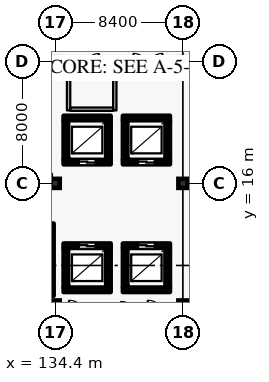
"""IFC4 building model, lengths in metres.
Left out: names, types, materials, properties, quantities, classifications, styles, units other than length and angle.
Written with IfcOpenShell. Run it as: python <this file> out.ifc"""

import sys

from ifc_helpers import new_model, si_unit, direction, frame, frame_2d, origin, origin_2d, place, context, subcontext, project, spatial, rectangle, extrude, element, fill, save


model = new_model("IFC4")
c1 = context("Model", 3, precision=1e-05, world=origin(), true_north=direction((0.0, 1.0)))
c2 = subcontext(c1, "Body", "Model", "MODEL_VIEW")
j1 = project(units=[si_unit("LENGTHUNIT", "METRE"), si_unit("PLANEANGLEUNIT", "RADIAN")], contexts=[c1])
p1 = place(None, origin())
s1 = spatial("IfcSite", under=j1, at=p1, CompositionType="ELEMENT")
p2 = place(p1, origin())
s2 = spatial("IfcBuilding", under=s1, at=p2, CompositionType="ELEMENT")
p3 = place(p2, frame((0.0, 0.0, 43.2)))
s3 = spatial("IfcBuildingStorey", under=s2, at=p3, CompositionType="ELEMENT", Elevation=43.2)
for number, where, z_axis, x_axis in (
    (1, (134.4, 16.0, 0.0), (0.0, 0.0, 1.0), (1.0, 0.0, 0.0)),
    (2, (142.8, 16.0, 0.0), (0.0, 0.0, 1.0), (1.0, 0.0, 0.0)),
    (3, (134.4, 8.0, 0.0), (0.0, 0.0, 1.0), (1.0, 0.0, 0.0)),
    (4, (134.4, 24.0, 0.0), (0.0, 0.0, 1.0), (1.0, 0.0, 0.0)),
    (5, (142.8, 8.0, 0.0), (0.0, 0.0, 1.0), (1.0, 0.0, 0.0)),
    (6, (142.8, 24.0, 0.0), (0.0, 0.0, 1.0), (1.0, 0.0, 0.0)),
):
    element("IfcColumn", number, at=place(p3, frame(where, z_axis=z_axis, x_axis=x_axis)), inside=s3, PredefinedType="COLUMN", context=c2, shape_type="SweptSolid", body=[
        extrude(rectangle(XDim=0.6, YDim=0.6, at=origin_2d()), origin(), (0.0, 0.0, 1.0), 4.2),
    ])
p4 = place(p3, frame((134.95, 17.4, 0.0), z_axis=(0.0, 0.0, 1.0), x_axis=(1.0, 0.0, 0.0)))
e7 = element("IfcWall", 7, at=p4, inside=s3, PredefinedType="SHEAR", context=c2, shape_type="SweptSolid", body=[
    extrude(rectangle(XDim=3.1, YDim=0.3, at=frame_2d((1.55, 0.0))), origin(), (0.0, 0.0, 1.0), 3.935),
])
p5 = place(p4, frame((1.0, 0.0, 0.0)))
e8 = element("IfcOpeningElement", 8, at=p5, cuts=e7, PredefinedType="OPENING", context=c2, shape_type="SweptSolid", body=[
    extrude(rectangle(XDim=1.1, YDim=2.2, at=frame_2d((0.55, 1.1))), frame((0.0, 0.16, 0.0), z_axis=(0.0, -1.0, 0.0), x_axis=(1.0, 0.0, 0.0)), (0.0, 0.0, 1.0), 0.32),
])
p6 = place(p3, frame((137.9, 17.555, 0.0), z_axis=(0.0, 0.0, 1.0), x_axis=(0.0, 1.0, 0.0)))
e9 = element("IfcWall", 9, at=p6, inside=s3, PredefinedType="SHEAR", context=c2, shape_type="SweptSolid", body=[
    extrude(rectangle(XDim=2.59, YDim=0.3, at=frame_2d((1.295, 0.0))), origin(), (0.0, 0.0, 1.0), 3.935),
])
p7 = place(p3, frame((138.05, 20.3, 0.0), z_axis=(0.0, 0.0, 1.0), x_axis=(-1.0, 0.0, 0.0)))
e10 = element("IfcWall", 10, at=p7, inside=s3, PredefinedType="SHEAR", context=c2, shape_type="SweptSolid", body=[
    extrude(rectangle(XDim=3.1, YDim=0.3, at=frame_2d((1.55, 0.0))), origin(), (0.0, 0.0, 1.0), 3.935),
])
p8 = place(p3, frame((135.1, 20.145, 0.0), z_axis=(0.0, 0.0, 1.0), x_axis=(0.0, -1.0, 0.0)))
e11 = element("IfcWall", 11, at=p8, inside=s3, PredefinedType="SHEAR", context=c2, shape_type="SweptSolid", body=[
    extrude(rectangle(XDim=2.59, YDim=0.3, at=frame_2d((1.295, 0.0))), origin(), (0.0, 0.0, 1.0), 3.935),
])
p9 = place(p3, frame((138.85, 17.4, 0.0), z_axis=(0.0, 0.0, 1.0), x_axis=(1.0, 0.0, 0.0)))
e12 = element("IfcWall", 12, at=p9, inside=s3, PredefinedType="SHEAR", context=c2, shape_type="SweptSolid", body=[
    extrude(rectangle(XDim=3.1, YDim=0.3, at=frame_2d((1.55, 0.0))), origin(), (0.0, 0.0, 1.0), 3.935),
])
p10 = place(p9, frame((1.0, 0.0, 0.0)))
e13 = element("IfcOpeningElement", 13, at=p10, cuts=e12, PredefinedType="OPENING", context=c2, shape_type="SweptSolid", body=[
    extrude(rectangle(XDim=1.1, YDim=2.2, at=frame_2d((0.55, 1.1))), frame((0.0, 0.16, 0.0), z_axis=(0.0, -1.0, 0.0), x_axis=(1.0, 0.0, 0.0)), (0.0, 0.0, 1.0), 0.32),
])
p11 = place(p3, frame((141.8, 17.555, 0.0), z_axis=(0.0, 0.0, 1.0), x_axis=(0.0, 1.0, 0.0)))
e14 = element("IfcWall", 14, at=p11, inside=s3, PredefinedType="SHEAR", context=c2, shape_type="SweptSolid", body=[
    extrude(rectangle(XDim=2.59, YDim=0.3, at=frame_2d((1.295, 0.0))), origin(), (0.0, 0.0, 1.0), 3.935),
])
p12 = place(p3, frame((141.95, 20.3, 0.0), z_axis=(0.0, 0.0, 1.0), x_axis=(-1.0, 0.0, 0.0)))
e15 = element("IfcWall", 15, at=p12, inside=s3, PredefinedType="SHEAR", context=c2, shape_type="SweptSolid", body=[
    extrude(rectangle(XDim=3.1, YDim=0.3, at=frame_2d((1.55, 0.0))), origin(), (0.0, 0.0, 1.0), 3.935),
])
p13 = place(p3, frame((139.0, 20.145, 0.0), z_axis=(0.0, 0.0, 1.0), x_axis=(0.0, -1.0, 0.0)))
e16 = element("IfcWall", 16, at=p13, inside=s3, PredefinedType="SHEAR", context=c2, shape_type="SweptSolid", body=[
    extrude(rectangle(XDim=2.59, YDim=0.3, at=frame_2d((1.295, 0.0))), origin(), (0.0, 0.0, 1.0), 3.935),
])
p14 = place(p3, frame((134.95, 9.0, 0.0), z_axis=(0.0, 0.0, 1.0), x_axis=(1.0, 0.0, 0.0)))
e17 = element("IfcWall", 17, at=p14, inside=s3, PredefinedType="SHEAR", context=c2, shape_type="SweptSolid", body=[
    extrude(rectangle(XDim=3.1, YDim=0.3, at=frame_2d((1.55, 0.0))), origin(), (0.0, 0.0, 1.0), 3.935),
])
p15 = place(p3, frame((137.9, 9.155, 0.0), z_axis=(0.0, 0.0, 1.0), x_axis=(0.0, 1.0, 0.0)))
e18 = element("IfcWall", 18, at=p15, inside=s3, PredefinedType="SHEAR", context=c2, shape_type="SweptSolid", body=[
    extrude(rectangle(XDim=2.59, YDim=0.3, at=frame_2d((1.295, 0.0))), origin(), (0.0, 0.0, 1.0), 3.935),
])
p16 = place(p3, frame((138.05, 11.9, 0.0), z_axis=(0.0, 0.0, 1.0), x_axis=(-1.0, 0.0, 0.0)))
e19 = element("IfcWall", 19, at=p16, inside=s3, PredefinedType="SHEAR", context=c2, shape_type="SweptSolid", body=[
    extrude(rectangle(XDim=3.1, YDim=0.3, at=frame_2d((1.55, 0.0))), origin(), (0.0, 0.0, 1.0), 3.935),
])
p17 = place(p16, frame((1.0, 0.0, 0.0)))
e20 = element("IfcOpeningElement", 20, at=p17, cuts=e19, PredefinedType="OPENING", context=c2, shape_type="SweptSolid", body=[
    extrude(rectangle(XDim=1.1, YDim=2.2, at=frame_2d((0.55, 1.1))), frame((0.0, 0.16, 0.0), z_axis=(0.0, -1.0, 0.0), x_axis=(1.0, 0.0, 0.0)), (0.0, 0.0, 1.0), 0.32),
])
p18 = place(p3, frame((135.1, 11.745, 0.0), z_axis=(0.0, 0.0, 1.0), x_axis=(0.0, -1.0, 0.0)))
e21 = element("IfcWall", 21, at=p18, inside=s3, PredefinedType="SHEAR", context=c2, shape_type="SweptSolid", body=[
    extrude(rectangle(XDim=2.59, YDim=0.3, at=frame_2d((1.295, 0.0))), origin(), (0.0, 0.0, 1.0), 3.935),
])
p19 = place(p3, frame((138.85, 9.0, 0.0), z_axis=(0.0, 0.0, 1.0), x_axis=(1.0, 0.0, 0.0)))
e22 = element("IfcWall", 22, at=p19, inside=s3, PredefinedType="SHEAR", context=c2, shape_type="SweptSolid", body=[
    extrude(rectangle(XDim=3.1, YDim=0.3, at=frame_2d((1.55, 0.0))), origin(), (0.0, 0.0, 1.0), 3.935),
])
p20 = place(p3, frame((141.8, 9.155, 0.0), z_axis=(0.0, 0.0, 1.0), x_axis=(0.0, 1.0, 0.0)))
e23 = element("IfcWall", 23, at=p20, inside=s3, PredefinedType="SHEAR", context=c2, shape_type="SweptSolid", body=[
    extrude(rectangle(XDim=2.59, YDim=0.3, at=frame_2d((1.295, 0.0))), origin(), (0.0, 0.0, 1.0), 3.935),
])
p21 = place(p3, frame((141.95, 11.9, 0.0), z_axis=(0.0, 0.0, 1.0), x_axis=(-1.0, 0.0, 0.0)))
e24 = element("IfcWall", 24, at=p21, inside=s3, PredefinedType="SHEAR", context=c2, shape_type="SweptSolid", body=[
    extrude(rectangle(XDim=3.1, YDim=0.3, at=frame_2d((1.55, 0.0))), origin(), (0.0, 0.0, 1.0), 3.935),
])
p22 = place(p21, frame((1.0, 0.0, 0.0)))
e25 = element("IfcOpeningElement", 25, at=p22, cuts=e24, PredefinedType="OPENING", context=c2, shape_type="SweptSolid", body=[
    extrude(rectangle(XDim=1.1, YDim=2.2, at=frame_2d((0.55, 1.1))), frame((0.0, 0.16, 0.0), z_axis=(0.0, -1.0, 0.0), x_axis=(1.0, 0.0, 0.0)), (0.0, 0.0, 1.0), 0.32),
])
p23 = place(p3, frame((139.0, 11.745, 0.0), z_axis=(0.0, 0.0, 1.0), x_axis=(0.0, -1.0, 0.0)))
e26 = element("IfcWall", 26, at=p23, inside=s3, PredefinedType="SHEAR", context=c2, shape_type="SweptSolid", body=[
    extrude(rectangle(XDim=2.59, YDim=0.3, at=frame_2d((1.295, 0.0))), origin(), (0.0, 0.0, 1.0), 3.935),
])
p24 = place(p3, frame((126.15, 8.8, 0.0), z_axis=(0.0, 0.0, 1.0), x_axis=(1.0, 0.0, 0.0)))
e27 = element("IfcWall", 27, at=p24, inside=s3, PredefinedType="SHEAR", context=c2, shape_type="SweptSolid", body=[
    extrude(rectangle(XDim=8.15, YDim=0.4, at=frame_2d((4.075, 0.0))), origin(), (0.0, 0.0, 1.0), 3.935),
])
p25 = place(p3, frame((134.1, 9.005, 0.0), z_axis=(0.0, 0.0, 1.0), x_axis=(0.0, 1.0, 0.0)))
e28 = element("IfcWall", 28, at=p25, inside=s3, PredefinedType="SHEAR", context=c2, shape_type="SweptSolid", body=[
    extrude(rectangle(XDim=3.95, YDim=0.4, at=frame_2d((1.975, 0.0))), origin(), (0.0, 0.0, 1.0), 3.935),
])
p26 = place(p3, frame((126.15, 13.16, 0.0), z_axis=(0.0, 0.0, 1.0), x_axis=(1.0, 0.0, 0.0)))
e29 = element("IfcWall", 29, at=p26, inside=s3, PredefinedType="SHEAR", context=c2, shape_type="SweptSolid", body=[
    extrude(rectangle(XDim=8.15, YDim=0.4, at=frame_2d((4.075, 0.0))), origin(), (0.0, 0.0, 1.0), 3.935),
])
p27 = place(p26, frame((0.38, 0.0, 0.0)))
e30 = element("IfcOpeningElement", 30, at=p27, cuts=e29, PredefinedType="OPENING", context=c2, shape_type="SweptSolid", body=[
    extrude(rectangle(XDim=1.16, YDim=2.2, at=frame_2d((0.58, 1.1))), frame((0.0, 0.21, 0.0), z_axis=(0.0, -1.0, 0.0), x_axis=(1.0, 0.0, 0.0)), (0.0, 0.0, 1.0), 0.42),
])
p28 = place(p3, frame((138.96, 23.6, 0.0), z_axis=(0.0, 0.0, 1.0), x_axis=(1.0, 0.0, 0.0)))
e31 = element("IfcWall", 31, at=p28, inside=s3, PredefinedType="PARTITIONING", context=c2, shape_type="SweptSolid", body=[
    extrude(rectangle(XDim=3.08, YDim=0.14, at=frame_2d((1.54, 0.0))), origin(), (0.0, 0.0, 1.0), 3.935),
])
p29 = place(p28, frame((0.59, 0.0, 0.0)))
e32 = element("IfcOpeningElement", 32, at=p29, cuts=e31, PredefinedType="OPENING", context=c2, shape_type="SweptSolid", body=[
    extrude(rectangle(XDim=1.9, YDim=2.4, at=frame_2d((0.95, 1.2))), frame((0.0, 0.08, 0.0), z_axis=(0.0, -1.0, 0.0), x_axis=(1.0, 0.0, 0.0)), (0.0, 0.0, 1.0), 0.16),
])
p30 = place(p3, frame((135.36, 23.6, 0.0), z_axis=(0.0, 0.0, 1.0), x_axis=(1.0, 0.0, 0.0)))
e33 = element("IfcWall", 33, at=p30, inside=s3, PredefinedType="PARTITIONING", context=c2, shape_type="SweptSolid", body=[
    extrude(rectangle(XDim=2.88, YDim=0.22, at=frame_2d((1.44, 0.0))), origin(), (0.0, 0.0, 1.0), 3.935),
])
p31 = place(p30, frame((0.97, 0.0, 0.0)))
e34 = element("IfcOpeningElement", 34, at=p31, cuts=e33, PredefinedType="OPENING", context=c2, shape_type="SweptSolid", body=[
    extrude(rectangle(XDim=0.94, YDim=2.15, at=frame_2d((0.47, 1.075))), frame((0.0, 0.12, 0.0), z_axis=(0.0, -1.0, 0.0), x_axis=(1.0, 0.0, 0.0)), (0.0, 0.0, 1.0), 0.24),
])
for number, where, z_axis, x_axis in (
    (35, (135.28, 20.8, 0.0), (0.0, 0.0, 1.0), (0.0, 1.0, 0.0)),
    (36, (138.32, 20.8, 0.0), (0.0, 0.0, 1.0), (0.0, 1.0, 0.0)),
):
    element("IfcWall", number, at=place(p3, frame(where, z_axis=z_axis, x_axis=x_axis)), inside=s3, PredefinedType="PARTITIONING", context=c2, shape_type="SweptSolid", body=[
        extrude(rectangle(XDim=2.748, YDim=0.22, at=frame_2d((1.374, 0.0))), origin(), (0.0, 0.0, 1.0), 3.935),
    ])
p32 = place(p3, frame((135.39, 20.88, 0.0), z_axis=(0.0, 0.0, 1.0), x_axis=(1.0, 0.0, 0.0)))
e37 = element("IfcWall", 37, at=p32, inside=s3, PredefinedType="PARTITIONING", context=c2, shape_type="SweptSolid", body=[
    extrude(rectangle(XDim=2.82, YDim=0.22, at=frame_2d((1.41, 0.0))), origin(), (0.0, 0.0, 1.0), 3.935),
])
p33 = place(p5, origin())
e38 = element("IfcDoor", 38, at=p33, inside=s3, OperationType="DOUBLE_DOOR_SLIDING", PredefinedType="DOOR", context=c2, shape_type="SweptSolid", body=[
    extrude(rectangle(XDim=1.1, YDim=2.2, at=frame_2d((0.55, 1.1))), frame((0.0, 0.025, 0.0), z_axis=(0.0, -1.0, 0.0), x_axis=(1.0, 0.0, 0.0)), (0.0, 0.0, 1.0), 0.05),
])
fill(e8, e38)
p34 = place(p10, origin())
e39 = element("IfcDoor", 39, at=p34, inside=s3, OperationType="DOUBLE_DOOR_SLIDING", PredefinedType="DOOR", context=c2, shape_type="SweptSolid", body=[
    extrude(rectangle(XDim=1.1, YDim=2.2, at=frame_2d((0.55, 1.1))), frame((0.0, 0.025, 0.0), z_axis=(0.0, -1.0, 0.0), x_axis=(1.0, 0.0, 0.0)), (0.0, 0.0, 1.0), 0.05),
])
fill(e13, e39)
p35 = place(p17, origin())
e40 = element("IfcDoor", 40, at=p35, inside=s3, OperationType="DOUBLE_DOOR_SLIDING", PredefinedType="DOOR", context=c2, shape_type="SweptSolid", body=[
    extrude(rectangle(XDim=1.1, YDim=2.2, at=frame_2d((0.55, 1.1))), frame((0.0, 0.025, 0.0), z_axis=(0.0, -1.0, 0.0), x_axis=(1.0, 0.0, 0.0)), (0.0, 0.0, 1.0), 0.05),
])
fill(e20, e40)
p36 = place(p22, origin())
e41 = element("IfcDoor", 41, at=p36, inside=s3, OperationType="DOUBLE_DOOR_SLIDING", PredefinedType="DOOR", context=c2, shape_type="SweptSolid", body=[
    extrude(rectangle(XDim=1.1, YDim=2.2, at=frame_2d((0.55, 1.1))), frame((0.0, 0.025, 0.0), z_axis=(0.0, -1.0, 0.0), x_axis=(1.0, 0.0, 0.0)), (0.0, 0.0, 1.0), 0.05),
])
fill(e25, e41)
p37 = place(p29, origin())
e42 = element("IfcDoor", 42, at=p37, inside=s3, OperationType="DOUBLE_DOOR_SINGLE_SWING", PredefinedType="DOOR", context=c2, shape_type="SweptSolid", body=[
    extrude(rectangle(XDim=1.9, YDim=2.4, at=frame_2d((0.95, 1.2))), frame((0.0, 0.025, 0.0), z_axis=(0.0, -1.0, 0.0), x_axis=(1.0, 0.0, 0.0)), (0.0, 0.0, 1.0), 0.05),
])
fill(e32, e42)
p38 = place(p31, origin())
e43 = element("IfcDoor", 43, at=p38, inside=s3, OperationType="SINGLE_SWING_RIGHT", PredefinedType="DOOR", context=c2, shape_type="SweptSolid", body=[
    extrude(rectangle(XDim=0.94, YDim=2.15, at=frame_2d((0.47, 1.075))), frame((0.0, 0.025, 0.0), z_axis=(0.0, -1.0, 0.0), x_axis=(1.0, 0.0, 0.0)), (0.0, 0.0, 1.0), 0.05),
])
fill(e34, e43)
save(model, sys.argv[1])
